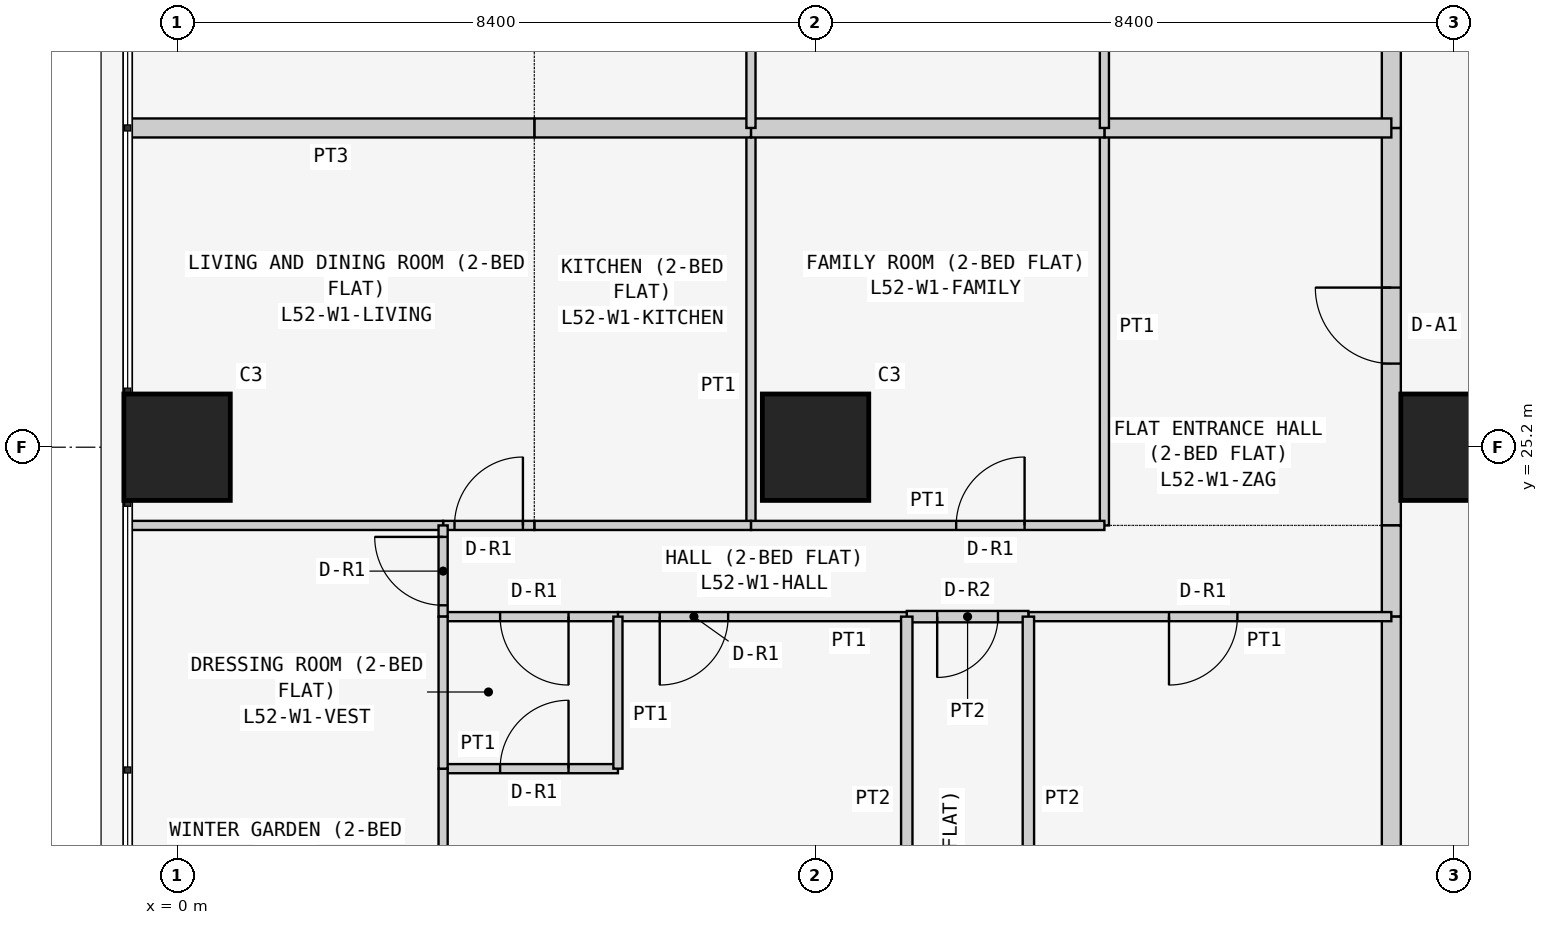
"""IFC4 building model, lengths in metres.
Left out: names, types, materials, properties, quantities, classifications, styles, units other than length and angle.
Written with IfcOpenShell. Run it as: python <this file> out.ifc"""

import sys

from ifc_helpers import new_model, si_unit, direction, frame, frame_2d, origin, origin_2d, place, context, subcontext, project, spatial, rectangle, extrude, element, fill, save


model = new_model("IFC4")
c1 = context("Model", 3, precision=1e-05, world=origin(), true_north=direction((0.0, 1.0)))
c2 = subcontext(c1, "Body", "Model", "MODEL_VIEW")
j1 = project(units=[si_unit("LENGTHUNIT", "METRE"), si_unit("PLANEANGLEUNIT", "RADIAN")], contexts=[c1])
p1 = place(None, origin())
s1 = spatial("IfcSite", under=j1, at=p1, CompositionType="ELEMENT")
p2 = place(p1, origin())
s2 = spatial("IfcBuilding", under=s1, at=p2, CompositionType="ELEMENT")
p3 = place(p2, frame((0.0, 0.0, 201.3)))
s3 = spatial("IfcBuildingStorey", under=s2, at=p3, CompositionType="ELEMENT", Elevation=201.3)
for number, where, z_axis, x_axis in (
    (1, (0.0, 25.2, 0.0), (0.0, 0.0, 1.0), (1.0, 0.0, 0.0)),
    (2, (8.4, 25.2, 0.0), (0.0, 0.0, 1.0), (1.0, 0.0, 0.0)),
    (3, (16.8, 25.2, 0.0), (0.0, 0.0, 1.0), (1.0, 0.0, 0.0)),
):
    element("IfcColumn", number, at=place(p3, frame(where, z_axis=z_axis, x_axis=x_axis)), inside=s3, PredefinedType="COLUMN", context=c2, shape_type="SweptSolid", body=[
        extrude(rectangle(XDim=1.4, YDim=1.4, at=origin_2d()), origin(), (0.0, 0.0, 1.0), 3.6),
    ])
p4 = place(p3, frame((15.975, 24.171, 0.0), z_axis=(0.0, 0.0, 1.0), x_axis=(0.0, 1.0, 0.0)))
e4 = element("IfcWall", 4, at=p4, inside=s3, PredefinedType="PARTITIONING", context=c2, shape_type="SweptSolid", body=[
    extrude(rectangle(XDim=5.229, YDim=0.25, at=frame_2d((2.615, 0.0))), origin(), (0.0, 0.0, 1.0), 3.45),
])
p5 = place(p4, frame((2.129, 0.0, 0.0)))
e5 = element("IfcOpeningElement", 5, at=p5, cuts=e4, PredefinedType="OPENING", context=c2, shape_type="SweptSolid", body=[
    extrude(rectangle(XDim=1.0, YDim=2.1, at=frame_2d((0.5, 1.05))), frame((0.0, 0.135, 0.0), z_axis=(0.0, -1.0, 0.0), x_axis=(1.0, 0.0, 0.0)), (0.0, 0.0, 1.0), 0.27),
])
p6 = place(p3, frame((15.975, 22.971, 0.0), z_axis=(0.0, 0.0, 1.0), x_axis=(0.0, 1.0, 0.0)))
e6 = element("IfcWall", 6, at=p6, inside=s3, PredefinedType="PARTITIONING", context=c2, shape_type="SweptSolid", body=[
    extrude(rectangle(XDim=1.2, YDim=0.25, at=frame_2d((0.6, 0.0))), origin(), (0.0, 0.0, 1.0), 3.45),
])
p7 = place(p3, frame((15.975, 16.1, 0.0), z_axis=(0.0, 0.0, 1.0), x_axis=(0.0, 1.0, 0.0)))
e7 = element("IfcWall", 7, at=p7, inside=s3, PredefinedType="PARTITIONING", context=c2, shape_type="SweptSolid", body=[
    extrude(rectangle(XDim=6.871, YDim=0.25, at=frame_2d((3.436, 0.0))), origin(), (0.0, 0.0, 1.0), 3.45),
])
p8 = place(p3, frame((15.975, 29.4, 0.0), z_axis=(0.0, 0.0, 1.0), x_axis=(0.0, 1.0, 0.0)))
e8 = element("IfcWall", 8, at=p8, inside=s3, PredefinedType="PARTITIONING", context=c2, shape_type="SweptSolid", body=[
    extrude(rectangle(XDim=5.229, YDim=0.25, at=frame_2d((2.615, 0.0))), origin(), (0.0, 0.0, 1.0), 3.45),
])
p9 = place(p8, frame((2.1, 0.0, 0.0)))
e9 = element("IfcOpeningElement", 9, at=p9, cuts=e8, PredefinedType="OPENING", context=c2, shape_type="SweptSolid", body=[
    extrude(rectangle(XDim=1.0, YDim=2.1, at=frame_2d((0.5, 1.05))), frame((0.0, 0.135, 0.0), z_axis=(0.0, -1.0, 0.0), x_axis=(1.0, 0.0, 0.0)), (0.0, 0.0, 1.0), 0.27),
])
p10 = place(p3, frame((12.2, 29.4, 0.0), z_axis=(0.0, 0.0, 1.0), x_axis=(0.0, -1.0, 0.0)))
e10 = element("IfcWall", 10, at=p10, inside=s3, PredefinedType="PARTITIONING", context=c2, shape_type="SweptSolid", body=[
    extrude(rectangle(XDim=5.229, YDim=0.12, at=frame_2d((2.615, 0.0))), origin(), (0.0, 0.0, 1.0), 3.45),
])
p11 = place(p3, frame((15.975, 29.4, 0.0), z_axis=(0.0, 0.0, 1.0), x_axis=(-1.0, 0.0, 0.0)))
e11 = element("IfcWall", 11, at=p11, inside=s3, PredefinedType="PARTITIONING", context=c2, shape_type="SweptSolid", body=[
    extrude(rectangle(XDim=3.775, YDim=0.25, at=frame_2d((1.888, 0.0))), origin(), (0.0, 0.0, 1.0), 3.45),
])
p12 = place(p3, frame((7.55, 29.4, 0.0), z_axis=(0.0, 0.0, 1.0), x_axis=(0.0, -1.0, 0.0)))
e12 = element("IfcWall", 12, at=p12, inside=s3, PredefinedType="PARTITIONING", context=c2, shape_type="SweptSolid", body=[
    extrude(rectangle(XDim=5.229, YDim=0.12, at=frame_2d((2.615, 0.0))), origin(), (0.0, 0.0, 1.0), 3.45),
])
p13 = place(p3, frame((7.55, 24.171, 0.0), z_axis=(0.0, 0.0, 1.0), x_axis=(1.0, 0.0, 0.0)))
e13 = element("IfcWall", 13, at=p13, inside=s3, PredefinedType="PARTITIONING", context=c2, shape_type="SweptSolid", body=[
    extrude(rectangle(XDim=4.65, YDim=0.12, at=frame_2d((2.325, 0.0))), origin(), (0.0, 0.0, 1.0), 3.45),
])
p14 = place(p13, frame((2.7, 0.0, 0.0)))
e14 = element("IfcOpeningElement", 14, at=p14, cuts=e13, PredefinedType="OPENING", context=c2, shape_type="SweptSolid", body=[
    extrude(rectangle(XDim=0.9, YDim=2.1, at=frame_2d((0.45, 1.05))), frame((0.0, 0.07, 0.0), z_axis=(0.0, -1.0, 0.0), x_axis=(1.0, 0.0, 0.0)), (0.0, 0.0, 1.0), 0.14),
])
p15 = place(p3, frame((12.2, 29.4, 0.0), z_axis=(0.0, 0.0, 1.0), x_axis=(-1.0, 0.0, 0.0)))
e15 = element("IfcWall", 15, at=p15, inside=s3, PredefinedType="PARTITIONING", context=c2, shape_type="SweptSolid", body=[
    extrude(rectangle(XDim=4.65, YDim=0.25, at=frame_2d((2.325, 0.0))), origin(), (0.0, 0.0, 1.0), 3.45),
])
p16 = place(p3, frame((4.7, 24.171, 0.0), z_axis=(0.0, 0.0, 1.0), x_axis=(1.0, 0.0, 0.0)))
e16 = element("IfcWall", 16, at=p16, inside=s3, PredefinedType="PARTITIONING", context=c2, shape_type="SweptSolid", body=[
    extrude(rectangle(XDim=2.85, YDim=0.12, at=frame_2d((1.425, 0.0))), origin(), (0.0, 0.0, 1.0), 3.45),
])
p17 = place(p3, frame((7.55, 29.4, 0.0), z_axis=(0.0, 0.0, 1.0), x_axis=(-1.0, 0.0, 0.0)))
e17 = element("IfcWall", 17, at=p17, inside=s3, PredefinedType="PARTITIONING", context=c2, shape_type="SweptSolid", body=[
    extrude(rectangle(XDim=2.85, YDim=0.25, at=frame_2d((1.425, 0.0))), origin(), (0.0, 0.0, 1.0), 3.45),
])
p18 = place(p3, frame((3.5, 24.171, 0.0), z_axis=(0.0, 0.0, 1.0), x_axis=(1.0, 0.0, 0.0)))
e18 = element("IfcWall", 18, at=p18, inside=s3, PredefinedType="PARTITIONING", context=c2, shape_type="SweptSolid", body=[
    extrude(rectangle(XDim=1.2, YDim=0.12, at=frame_2d((0.6, 0.0))), origin(), (0.0, 0.0, 1.0), 3.45),
])
p19 = place(p18, frame((0.15, 0.0, 0.0)))
e19 = element("IfcOpeningElement", 19, at=p19, cuts=e18, PredefinedType="OPENING", context=c2, shape_type="SweptSolid", body=[
    extrude(rectangle(XDim=0.9, YDim=2.1, at=frame_2d((0.45, 1.05))), frame((0.0, 0.07, 0.0), z_axis=(0.0, -1.0, 0.0), x_axis=(1.0, 0.0, 0.0)), (0.0, 0.0, 1.0), 0.14),
])
p20 = place(p3, frame((-0.65, 24.171, 0.0), z_axis=(0.0, 0.0, 1.0), x_axis=(1.0, 0.0, 0.0)))
e20 = element("IfcWall", 20, at=p20, inside=s3, PredefinedType="PARTITIONING", context=c2, shape_type="SweptSolid", body=[
    extrude(rectangle(XDim=4.15, YDim=0.12, at=frame_2d((2.075, 0.0))), origin(), (0.0, 0.0, 1.0), 3.45),
])
p21 = place(p3, frame((4.7, 29.4, 0.0), z_axis=(0.0, 0.0, 1.0), x_axis=(-1.0, 0.0, 0.0)))
e21 = element("IfcWall", 21, at=p21, inside=s3, PredefinedType="PARTITIONING", context=c2, shape_type="SweptSolid", body=[
    extrude(rectangle(XDim=5.35, YDim=0.25, at=frame_2d((2.675, 0.0))), origin(), (0.0, 0.0, 1.0), 3.45),
])
p22 = place(p3, frame((11.2, 22.971, 0.0), z_axis=(0.0, 0.0, 1.0), x_axis=(1.0, 0.0, 0.0)))
e22 = element("IfcWall", 22, at=p22, inside=s3, PredefinedType="PARTITIONING", context=c2, shape_type="SweptSolid", body=[
    extrude(rectangle(XDim=4.775, YDim=0.12, at=frame_2d((2.388, 0.0))), origin(), (0.0, 0.0, 1.0), 3.45),
])
p23 = place(p22, frame((1.85, 0.0, 0.0)))
e23 = element("IfcOpeningElement", 23, at=p23, cuts=e22, PredefinedType="OPENING", context=c2, shape_type="SweptSolid", body=[
    extrude(rectangle(XDim=0.9, YDim=2.1, at=frame_2d((0.45, 1.05))), frame((0.0, 0.07, 0.0), z_axis=(0.0, -1.0, 0.0), x_axis=(1.0, 0.0, 0.0)), (0.0, 0.0, 1.0), 0.14),
])
p24 = place(p3, frame((9.6, 22.971, 0.0), z_axis=(0.0, 0.0, 1.0), x_axis=(1.0, 0.0, 0.0)))
e24 = element("IfcWall", 24, at=p24, inside=s3, PredefinedType="PARTITIONING", context=c2, shape_type="SweptSolid", body=[
    extrude(rectangle(XDim=1.6, YDim=0.15, at=frame_2d((0.8, 0.0))), origin(), (0.0, 0.0, 1.0), 3.45),
])
p25 = place(p24, frame((0.4, 0.0, 0.0)))
e25 = element("IfcOpeningElement", 25, at=p25, cuts=e24, PredefinedType="OPENING", context=c2, shape_type="SweptSolid", body=[
    extrude(rectangle(XDim=0.8, YDim=2.1, at=frame_2d((0.4, 1.05))), frame((0.0, 0.085, 0.0), z_axis=(0.0, -1.0, 0.0), x_axis=(1.0, 0.0, 0.0)), (0.0, 0.0, 1.0), 0.17),
])
p26 = place(p3, frame((5.8, 22.971, 0.0), z_axis=(0.0, 0.0, 1.0), x_axis=(1.0, 0.0, 0.0)))
e26 = element("IfcWall", 26, at=p26, inside=s3, PredefinedType="PARTITIONING", context=c2, shape_type="SweptSolid", body=[
    extrude(rectangle(XDim=3.8, YDim=0.12, at=frame_2d((1.9, 0.0))), origin(), (0.0, 0.0, 1.0), 3.45),
])
p27 = place(p26, frame((0.55, 0.0, 0.0)))
e27 = element("IfcOpeningElement", 27, at=p27, cuts=e26, PredefinedType="OPENING", context=c2, shape_type="SweptSolid", body=[
    extrude(rectangle(XDim=0.9, YDim=2.1, at=frame_2d((0.45, 1.05))), frame((0.0, 0.07, 0.0), z_axis=(0.0, -1.0, 0.0), x_axis=(1.0, 0.0, 0.0)), (0.0, 0.0, 1.0), 0.14),
])
p28 = place(p3, frame((3.5, 22.971, 0.0), z_axis=(0.0, 0.0, 1.0), x_axis=(1.0, 0.0, 0.0)))
e28 = element("IfcWall", 28, at=p28, inside=s3, PredefinedType="PARTITIONING", context=c2, shape_type="SweptSolid", body=[
    extrude(rectangle(XDim=2.3, YDim=0.12, at=frame_2d((1.15, 0.0))), origin(), (0.0, 0.0, 1.0), 3.45),
])
p29 = place(p28, frame((0.75, 0.0, 0.0)))
e29 = element("IfcOpeningElement", 29, at=p29, cuts=e28, PredefinedType="OPENING", context=c2, shape_type="SweptSolid", body=[
    extrude(rectangle(XDim=0.9, YDim=2.1, at=frame_2d((0.45, 1.05))), frame((0.0, 0.07, 0.0), z_axis=(0.0, -1.0, 0.0), x_axis=(1.0, 0.0, 0.0)), (0.0, 0.0, 1.0), 0.14),
])
p30 = place(p3, frame((3.5, 24.171, 0.0), z_axis=(0.0, 0.0, 1.0), x_axis=(0.0, -1.0, 0.0)))
e30 = element("IfcWall", 30, at=p30, inside=s3, PredefinedType="PARTITIONING", context=c2, shape_type="SweptSolid", body=[
    extrude(rectangle(XDim=1.2, YDim=0.12, at=frame_2d((0.6, 0.0))), origin(), (0.0, 0.0, 1.0), 3.45),
])
p31 = place(p30, frame((0.151, 0.0, 0.0)))
e31 = element("IfcOpeningElement", 31, at=p31, cuts=e30, PredefinedType="OPENING", context=c2, shape_type="SweptSolid", body=[
    extrude(rectangle(XDim=0.9, YDim=2.1, at=frame_2d((0.45, 1.05))), frame((0.0, 0.07, 0.0), z_axis=(0.0, -1.0, 0.0), x_axis=(1.0, 0.0, 0.0)), (0.0, 0.0, 1.0), 0.14),
])
for number, where, z_axis, x_axis in (
    (32, (11.2, 22.971, 0.0), (0.0, 0.0, 1.0), (0.0, -1.0, 0.0)),
    (33, (9.6, 22.971, 0.0), (0.0, 0.0, 1.0), (0.0, -1.0, 0.0)),
):
    element("IfcWall", number, at=place(p3, frame(where, z_axis=z_axis, x_axis=x_axis)), inside=s3, PredefinedType="PARTITIONING", context=c2, shape_type="SweptSolid", body=[
        extrude(rectangle(XDim=6.871, YDim=0.15, at=frame_2d((3.436, 0.0))), origin(), (0.0, 0.0, 1.0), 3.45),
    ])
p32 = place(p3, frame((3.5, 20.971, 0.0), z_axis=(0.0, 0.0, 1.0), x_axis=(1.0, 0.0, 0.0)))
e34 = element("IfcWall", 34, at=p32, inside=s3, PredefinedType="PARTITIONING", context=c2, shape_type="SweptSolid", body=[
    extrude(rectangle(XDim=2.3, YDim=0.12, at=frame_2d((1.15, 0.0))), origin(), (0.0, 0.0, 1.0), 3.45),
])
p33 = place(p32, frame((0.75, 0.0, 0.0)))
e35 = element("IfcOpeningElement", 35, at=p33, cuts=e34, PredefinedType="OPENING", context=c2, shape_type="SweptSolid", body=[
    extrude(rectangle(XDim=0.9, YDim=2.1, at=frame_2d((0.45, 1.05))), frame((0.0, 0.07, 0.0), z_axis=(0.0, -1.0, 0.0), x_axis=(1.0, 0.0, 0.0)), (0.0, 0.0, 1.0), 0.14),
])
p34 = place(p3, frame((5.8, 20.971, 0.0), z_axis=(0.0, 0.0, 1.0), x_axis=(0.0, 1.0, 0.0)))
e36 = element("IfcWall", 36, at=p34, inside=s3, PredefinedType="PARTITIONING", context=c2, shape_type="SweptSolid", body=[
    extrude(rectangle(XDim=2.0, YDim=0.12, at=frame_2d((1.0, 0.0))), origin(), (0.0, 0.0, 1.0), 3.45),
])
p35 = place(p3, frame((3.5, 16.1, 0.0), z_axis=(0.0, 0.0, 1.0), x_axis=(0.0, 1.0, 0.0)))
e37 = element("IfcWall", 37, at=p35, inside=s3, PredefinedType="PARTITIONING", context=c2, shape_type="SweptSolid", body=[
    extrude(rectangle(XDim=4.871, YDim=0.12, at=frame_2d((2.436, 0.0))), origin(), (0.0, 0.0, 1.0), 3.45),
])
p36 = place(p3, frame((3.5, 22.971, 0.0), z_axis=(0.0, 0.0, 1.0), x_axis=(0.0, -1.0, 0.0)))
e38 = element("IfcWall", 38, at=p36, inside=s3, PredefinedType="PARTITIONING", context=c2, shape_type="SweptSolid", body=[
    extrude(rectangle(XDim=2.0, YDim=0.12, at=frame_2d((1.0, 0.0))), origin(), (0.0, 0.0, 1.0), 3.45),
])
for number, where, z_axis, x_axis in (
    (39, (12.2, 29.4, 0.0), (0.0, 0.0, 1.0), (0.0, 1.0, 0.0)),
    (40, (7.55, 29.4, 0.0), (0.0, 0.0, 1.0), (0.0, 1.0, 0.0)),
):
    element("IfcWall", number, at=place(p3, frame(where, z_axis=z_axis, x_axis=x_axis)), inside=s3, PredefinedType="PARTITIONING", context=c2, shape_type="SweptSolid", body=[
        extrude(rectangle(XDim=5.229, YDim=0.12, at=frame_2d((2.615, 0.0))), origin(), (0.0, 0.0, 1.0), 3.45),
    ])
p37 = place(p5, origin())
e41 = element("IfcDoor", 41, at=p37, inside=s3, OperationType="SINGLE_SWING_RIGHT", PredefinedType="DOOR", context=c2, shape_type="SweptSolid", body=[
    extrude(rectangle(XDim=1.0, YDim=2.1, at=frame_2d((0.5, 1.05))), frame((0.0, 0.025, 0.0), z_axis=(0.0, -1.0, 0.0), x_axis=(1.0, 0.0, 0.0)), (0.0, 0.0, 1.0), 0.05),
])
fill(e5, e41)
p38 = place(p14, origin())
e42 = element("IfcDoor", 42, at=p38, inside=s3, OperationType="SINGLE_SWING_RIGHT", PredefinedType="DOOR", context=c2, shape_type="SweptSolid", body=[
    extrude(rectangle(XDim=0.9, YDim=2.1, at=frame_2d((0.45, 1.05))), frame((0.0, 0.025, 0.0), z_axis=(0.0, -1.0, 0.0), x_axis=(1.0, 0.0, 0.0)), (0.0, 0.0, 1.0), 0.05),
])
fill(e14, e42)
p39 = place(p19, origin())
e43 = element("IfcDoor", 43, at=p39, inside=s3, OperationType="SINGLE_SWING_RIGHT", PredefinedType="DOOR", context=c2, shape_type="SweptSolid", body=[
    extrude(rectangle(XDim=0.9, YDim=2.1, at=frame_2d((0.45, 1.05))), frame((0.0, 0.025, 0.0), z_axis=(0.0, -1.0, 0.0), x_axis=(1.0, 0.0, 0.0)), (0.0, 0.0, 1.0), 0.05),
])
fill(e19, e43)
p40 = place(p23, frame((0.9, 0.0, 0.0), z_axis=(0.0, 0.0, 1.0), x_axis=(-1.0, 0.0, 0.0)))
e44 = element("IfcDoor", 44, at=p40, inside=s3, OperationType="SINGLE_SWING_RIGHT", PredefinedType="DOOR", context=c2, shape_type="SweptSolid", body=[
    extrude(rectangle(XDim=0.9, YDim=2.1, at=frame_2d((0.45, 1.05))), frame((0.0, 0.025, 0.0), z_axis=(0.0, -1.0, 0.0), x_axis=(1.0, 0.0, 0.0)), (0.0, 0.0, 1.0), 0.05),
])
fill(e23, e44)
p41 = place(p25, frame((0.8, 0.0, 0.0), z_axis=(0.0, 0.0, 1.0), x_axis=(-1.0, 0.0, 0.0)))
e45 = element("IfcDoor", 45, at=p41, inside=s3, OperationType="SINGLE_SWING_RIGHT", PredefinedType="DOOR", context=c2, shape_type="SweptSolid", body=[
    extrude(rectangle(XDim=0.8, YDim=2.1, at=frame_2d((0.4, 1.05))), frame((0.0, 0.025, 0.0), z_axis=(0.0, -1.0, 0.0), x_axis=(1.0, 0.0, 0.0)), (0.0, 0.0, 1.0), 0.05),
])
fill(e25, e45)
p42 = place(p27, frame((0.9, 0.0, 0.0), z_axis=(0.0, 0.0, 1.0), x_axis=(-1.0, 0.0, 0.0)))
e46 = element("IfcDoor", 46, at=p42, inside=s3, OperationType="SINGLE_SWING_RIGHT", PredefinedType="DOOR", context=c2, shape_type="SweptSolid", body=[
    extrude(rectangle(XDim=0.9, YDim=2.1, at=frame_2d((0.45, 1.05))), frame((0.0, 0.025, 0.0), z_axis=(0.0, -1.0, 0.0), x_axis=(1.0, 0.0, 0.0)), (0.0, 0.0, 1.0), 0.05),
])
fill(e27, e46)
p43 = place(p29, frame((0.9, 0.0, 0.0), z_axis=(0.0, 0.0, 1.0), x_axis=(-1.0, 0.0, 0.0)))
e47 = element("IfcDoor", 47, at=p43, inside=s3, OperationType="SINGLE_SWING_LEFT", PredefinedType="DOOR", context=c2, shape_type="SweptSolid", body=[
    extrude(rectangle(XDim=0.9, YDim=2.1, at=frame_2d((0.45, 1.05))), frame((0.0, 0.025, 0.0), z_axis=(0.0, -1.0, 0.0), x_axis=(1.0, 0.0, 0.0)), (0.0, 0.0, 1.0), 0.05),
])
fill(e29, e47)
p44 = place(p33, origin())
e48 = element("IfcDoor", 48, at=p44, inside=s3, OperationType="SINGLE_SWING_RIGHT", PredefinedType="DOOR", context=c2, shape_type="SweptSolid", body=[
    extrude(rectangle(XDim=0.9, YDim=2.1, at=frame_2d((0.45, 1.05))), frame((0.0, 0.025, 0.0), z_axis=(0.0, -1.0, 0.0), x_axis=(1.0, 0.0, 0.0)), (0.0, 0.0, 1.0), 0.05),
])
fill(e35, e48)
p45 = place(p31, frame((0.9, 0.0, 0.0), z_axis=(0.0, 0.0, 1.0), x_axis=(-1.0, 0.0, 0.0)))
e49 = element("IfcDoor", 49, at=p45, inside=s3, OperationType="SINGLE_SWING_RIGHT", PredefinedType="DOOR", context=c2, shape_type="SweptSolid", body=[
    extrude(rectangle(XDim=0.9, YDim=2.1, at=frame_2d((0.45, 1.05))), frame((0.0, 0.025, 0.0), z_axis=(0.0, -1.0, 0.0), x_axis=(1.0, 0.0, 0.0)), (0.0, 0.0, 1.0), 0.05),
])
fill(e31, e49)
save(model, sys.argv[1])
